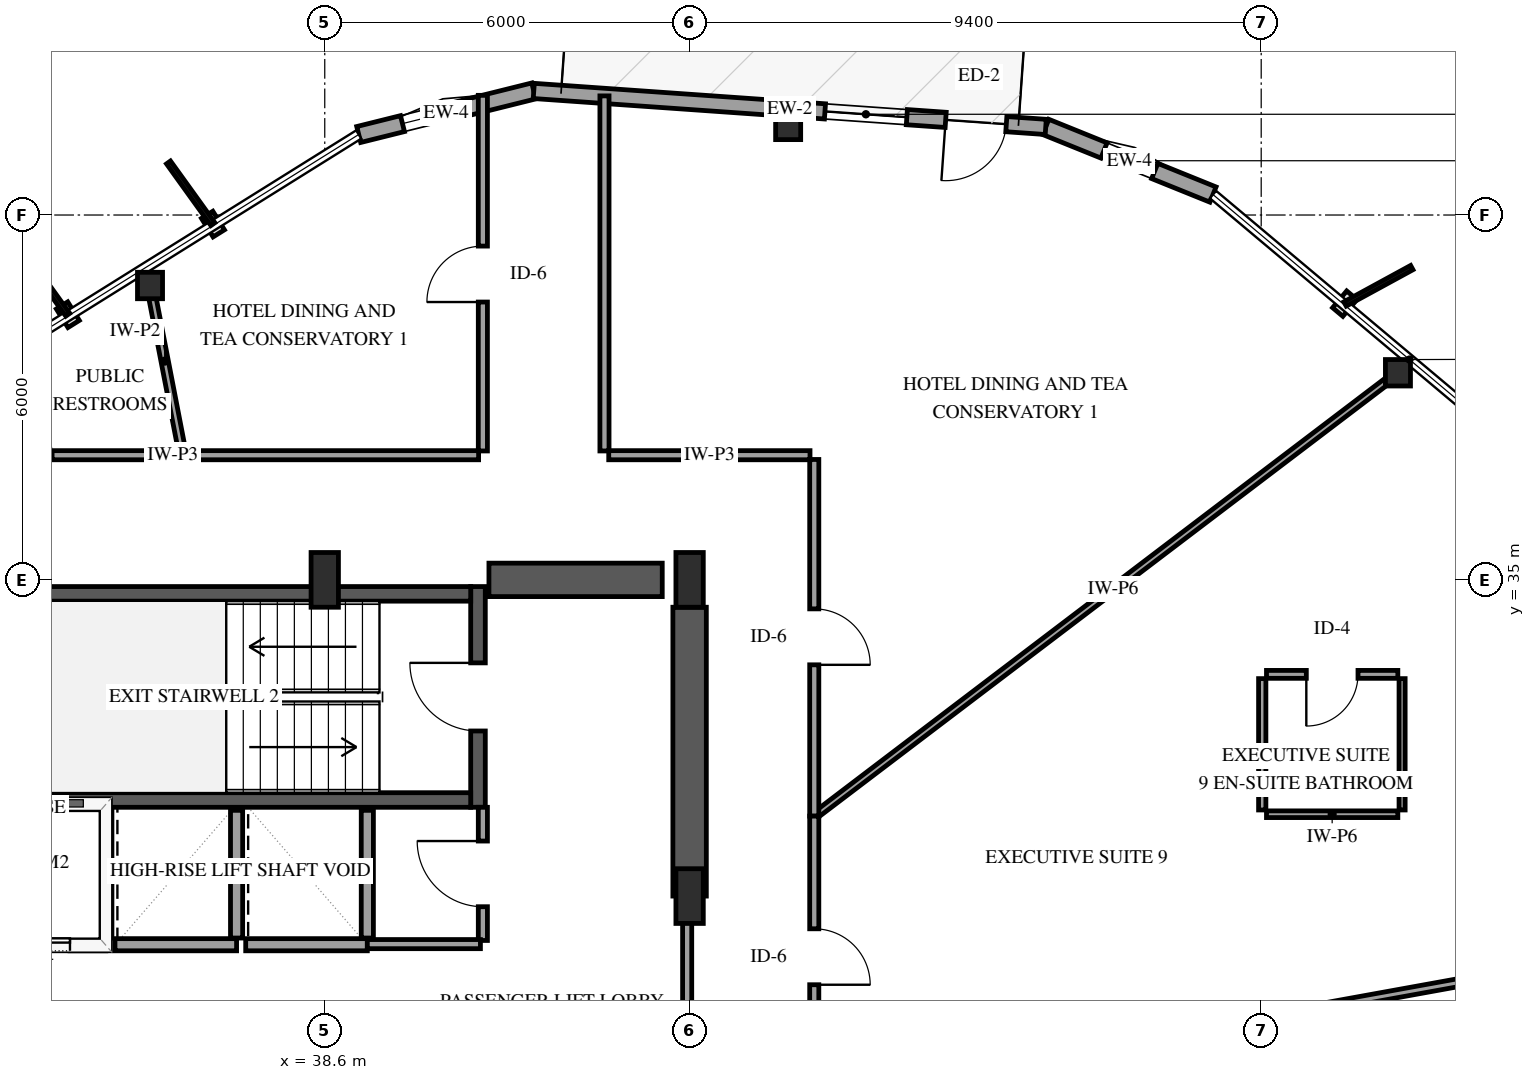
"""IFC4 building model, lengths in metres.
Left out: names, types, materials, properties, quantities, classifications, styles, units other than length and angle.
Written with IfcOpenShell. Run it as: python <this file> out.ifc"""

import sys

from ifc_helpers import new_model, si_unit, direction, frame, frame_2d, origin, origin_2d, place, context, subcontext, project, spatial, rectangle, i_section, extrude, element, fill, save


model = new_model("IFC4")
c1 = context("Model", 3, precision=1e-05, world=origin(), true_north=direction((0.0, 1.0)))
c2 = subcontext(c1, "Body", "Model", "MODEL_VIEW")
j1 = project(units=[si_unit("LENGTHUNIT", "METRE"), si_unit("PLANEANGLEUNIT", "RADIAN")], contexts=[c1])
p1 = place(None, origin())
s1 = spatial("IfcSite", under=j1, at=p1, CompositionType="ELEMENT")
p2 = place(p1, origin())
s2 = spatial("IfcBuilding", under=s1, at=p2, CompositionType="ELEMENT")
p3 = place(p2, frame((0.0, 0.0, 157.0)))
s3 = spatial("IfcBuildingStorey", under=s2, at=p3, CompositionType="ELEMENT", Elevation=157.0)
p4 = place(p3, frame((41.12, 31.26, 0.0), z_axis=(0.0, 0.0, 1.0), x_axis=(0.0, 1.0, 0.0)))
e1 = element("IfcWall", 1, at=p4, inside=s3, PredefinedType="SHEAR", context=c2, shape_type="SweptSolid", body=[
    extrude(rectangle(XDim=3.63, YDim=0.24, at=frame_2d((1.815, 0.0))), origin(), (0.0, 0.0, 1.0), 3.6),
])
p5 = place(p4, frame((1.255, 0.0, 0.0)))
e2 = element("IfcOpeningElement", 2, at=p5, cuts=e1, PredefinedType="OPENING", context=c2, shape_type="SweptSolid", body=[
    extrude(rectangle(XDim=1.12, YDim=2.15, at=frame_2d((0.56, 1.075))), frame((0.0, 0.13, 0.0), z_axis=(0.0, -1.0, 0.0), x_axis=(1.0, 0.0, 0.0)), (0.0, 0.0, 1.0), 0.26),
])
for number, where, z_axis, x_axis in (
    (3, (33.0, 31.38, 0.0), (0.0, 0.0, 1.0), (1.0, 0.0, 0.0)),
    (4, (33.0, 34.77, 0.0), (0.0, 0.0, 1.0), (1.0, 0.0, 0.0)),
):
    element("IfcWall", number, at=place(p3, frame(where, z_axis=z_axis, x_axis=x_axis)), inside=s3, PredefinedType="SHEAR", context=c2, shape_type="SweptSolid", body=[
        extrude(rectangle(XDim=8.0, YDim=0.24, at=frame_2d((4.0, 0.0))), origin(), (0.0, 0.0, 1.0), 3.6),
    ])
p6 = place(p3, frame((41.3, 35.0, 0.0), z_axis=(0.0, 0.0, 1.0), x_axis=(1.0, 0.0, 0.0)))
e5 = element("IfcWall", 5, at=p6, inside=s3, PredefinedType="SHEAR", context=c2, shape_type="SweptSolid", body=[
    extrude(rectangle(XDim=2.85, YDim=0.55, at=frame_2d((1.425, 0.0))), origin(), (0.0, 0.0, 1.0), 3.6),
])
p7 = place(p3, frame((44.6, 29.8, 0.0), z_axis=(0.0, 0.0, 1.0), x_axis=(0.0, 1.0, 0.0)))
e6 = element("IfcWall", 6, at=p7, inside=s3, PredefinedType="SHEAR", context=c2, shape_type="SweptSolid", body=[
    extrude(rectangle(XDim=4.75, YDim=0.55, at=frame_2d((2.375, 0.0))), origin(), (0.0, 0.0, 1.0), 3.6),
])
for number, where, z_axis, x_axis in (
    (7, (38.6, 35.0, 0.0), (0.0, 0.0, 1.0), (1.0, 0.0, 0.0)),
    (8, (44.6, 29.8, 0.0), (0.0, 0.0, 1.0), (1.0, 0.0, 0.0)),
    (9, (44.6, 35.0, 0.0), (0.0, 0.0, 1.0), (1.0, 0.0, 0.0)),
):
    element("IfcColumn", number, at=place(p3, frame(where, z_axis=z_axis, x_axis=x_axis)), inside=s3, PredefinedType="PILASTER", context=c2, shape_type="SweptSolid", body=[
        extrude(rectangle(XDim=0.45, YDim=0.9, at=origin_2d()), origin(), (0.0, 0.0, 1.0), 3.6),
    ])
for number, where, z_axis, x_axis in (
    (10, (56.249, 38.406, 0.0), (0.0, 0.0, 1.0), (1.0, 0.0, 0.0)),
    (11, (46.221, 42.458, 0.0), (0.0, 0.0, 1.0), (1.0, 0.0, 0.0)),
    (12, (35.726, 39.841, 0.0), (0.0, 0.0, 1.0), (1.0, 0.0, 0.0)),
):
    element("IfcColumn", number, at=place(p3, frame(where, z_axis=z_axis, x_axis=x_axis)), inside=s3, PredefinedType="COLUMN", context=c2, shape_type="SweptSolid", body=[
        extrude(i_section(OverallWidth=0.412, OverallDepth=0.435, WebThickness=0.036, FlangeThickness=0.057, FilletRadius=0.038, at=origin_2d()), origin(), (0.0, 0.0, 1.0), 3.6),
    ])
p8 = place(p3, frame((53.207, 41.337, 0.0), z_axis=(0.0, 0.0, 1.0), x_axis=(-0.927079641451, 0.374864426703, 0.0)))
e13 = element("IfcWall", 13, at=p8, inside=s3, PredefinedType="SOLIDWALL", context=c2, shape_type="SweptSolid", body=[
    extrude(rectangle(XDim=2.967, YDim=0.27, at=frame_2d((1.483, 0.0))), origin(), (0.0, 0.0, 1.0), 2.679),
])
p9 = place(p8, frame((1.033, 0.0, 0.75)))
e14 = element("IfcOpeningElement", 14, at=p9, cuts=e13, PredefinedType="OPENING", context=c2, shape_type="SweptSolid", body=[
    extrude(rectangle(XDim=0.9, YDim=1.5, at=frame_2d((0.45, 0.75))), frame((0.0, 0.145, 0.0), z_axis=(0.0, -1.0, 0.0), x_axis=(1.0, 0.0, 0.0)), (0.0, 0.0, 1.0), 0.29),
])
p10 = place(p3, frame((42.037, 43.041, 0.0), z_axis=(0.0, 0.0, 1.0), x_axis=(-0.970388894823, -0.241547909957, 0.0)))
e15 = element("IfcWall", 15, at=p10, inside=s3, PredefinedType="SOLIDWALL", context=c2, shape_type="SweptSolid", body=[
    extrude(rectangle(XDim=2.967, YDim=0.27, at=frame_2d((1.483, 0.0))), origin(), (0.0, 0.0, 1.0), 2.679),
])
p11 = place(p10, frame((1.325, 0.0, 0.75)))
e16 = element("IfcOpeningElement", 16, at=p11, cuts=e15, PredefinedType="OPENING", context=c2, shape_type="SweptSolid", body=[
    extrude(rectangle(XDim=0.9, YDim=1.5, at=frame_2d((0.45, 0.75))), frame((0.0, 0.145, 0.0), z_axis=(0.0, -1.0, 0.0), x_axis=(1.0, 0.0, 0.0)), (0.0, 0.0, 1.0), 0.29),
])
p12 = place(p3, frame((50.457, 42.449, 0.0), z_axis=(0.0, 0.0, 1.0), x_axis=(-0.997538958877, 0.070114374585, 0.0)))
e17 = element("IfcWall", 17, at=p12, inside=s3, PredefinedType="SOLIDWALL", context=c2, shape_type="SweptSolid", body=[
    extrude(rectangle(XDim=8.44, YDim=0.25, at=frame_2d((4.22, 0.0))), origin(), (0.0, 0.0, 1.0), 2.679),
])
p13 = place(p12, frame((0.65, 0.0, 0.0)))
e18 = element("IfcOpeningElement", 18, at=p13, cuts=e17, PredefinedType="OPENING", context=c2, shape_type="SweptSolid", body=[
    extrude(rectangle(XDim=1.0, YDim=2.15, at=frame_2d((0.5, 1.075))), frame((0.0, 0.135, 0.0), z_axis=(0.0, -1.0, 0.0), x_axis=(1.0, 0.0, 0.0)), (0.0, 0.0, 1.0), 0.27),
])
p14 = place(p12, frame((2.29, 0.0, 0.72)))
e19 = element("IfcOpeningElement", 19, at=p14, cuts=e17, PredefinedType="OPENING", context=c2, shape_type="SweptSolid", body=[
    extrude(rectangle(XDim=1.35, YDim=1.65, at=frame_2d((0.675, 0.825))), frame((0.0, 0.135, 0.0), z_axis=(0.0, -1.0, 0.0), x_axis=(1.0, 0.0, 0.0)), (0.0, 0.0, 1.0), 0.27),
])
p15 = place(p3, frame((32.72, 29.0, 0.0), z_axis=(0.0, 0.0, 1.0), x_axis=(1.0, 0.0, 0.0)))
e20 = element("IfcWall", 20, at=p15, inside=s3, PredefinedType="SOLIDWALL", context=c2, shape_type="SweptSolid", body=[
    extrude(rectangle(XDim=2.28, YDim=0.2, at=frame_2d((1.14, 0.0))), origin(), (0.0, 0.0, 1.0), 3.3),
])
p16 = place(p15, frame((0.59, 0.0, 0.0)))
e21 = element("IfcOpeningElement", 21, at=p16, cuts=e20, PredefinedType="OPENING", context=c2, shape_type="SweptSolid", body=[
    extrude(rectangle(XDim=1.1, YDim=2.15, at=frame_2d((0.55, 1.075))), frame((0.0, 0.11, 0.0), z_axis=(0.0, -1.0, 0.0), x_axis=(1.0, 0.0, 0.0)), (0.0, 0.0, 1.0), 0.22),
])
p17 = place(p3, frame((35.0, 29.11, 0.0), z_axis=(0.0, 0.0, 1.0), x_axis=(0.0, 1.0, 0.0)))
e22 = element("IfcWall", 22, at=p17, inside=s3, PredefinedType="SOLIDWALL", context=c2, shape_type="SweptSolid", body=[
    extrude(rectangle(XDim=2.1, YDim=0.2, at=frame_2d((1.05, 0.0))), origin(), (0.0, 0.0, 1.0), 3.3),
])
p18 = place(p3, frame((35.15, 29.0, 0.0), z_axis=(0.0, 0.0, 1.0), x_axis=(1.0, 0.0, 0.0)))
e23 = element("IfcWall", 23, at=p18, inside=s3, PredefinedType="SOLIDWALL", context=c2, shape_type="SweptSolid", body=[
    extrude(rectangle(XDim=2.0, YDim=0.2, at=frame_2d((1.0, 0.0))), origin(), (0.0, 0.0, 1.0), 3.3),
])
p19 = place(p3, frame((37.15, 29.11, 0.0), z_axis=(0.0, 0.0, 1.0), x_axis=(0.0, 1.0, 0.0)))
e24 = element("IfcWall", 24, at=p19, inside=s3, PredefinedType="SOLIDWALL", context=c2, shape_type="SweptSolid", body=[
    extrude(rectangle(XDim=2.1, YDim=0.2, at=frame_2d((1.05, 0.0))), origin(), (0.0, 0.0, 1.0), 3.3),
])
p20 = place(p3, frame((37.3, 29.0, 0.0), z_axis=(0.0, 0.0, 1.0), x_axis=(1.0, 0.0, 0.0)))
e25 = element("IfcWall", 25, at=p20, inside=s3, PredefinedType="SOLIDWALL", context=c2, shape_type="SweptSolid", body=[
    extrude(rectangle(XDim=2.0, YDim=0.2, at=frame_2d((1.0, 0.0))), origin(), (0.0, 0.0, 1.0), 3.3),
])
p21 = place(p3, frame((39.3, 29.11, 0.0), z_axis=(0.0, 0.0, 1.0), x_axis=(0.0, 1.0, 0.0)))
e26 = element("IfcWall", 26, at=p21, inside=s3, PredefinedType="SOLIDWALL", context=c2, shape_type="SweptSolid", body=[
    extrude(rectangle(XDim=2.1, YDim=0.2, at=frame_2d((1.05, 0.0))), origin(), (0.0, 0.0, 1.0), 3.3),
])
p22 = place(p3, frame((62.264, 29.286, 0.0), z_axis=(0.0, 0.0, 1.0), x_axis=(-0.98399202702, -0.178212487671, 0.0)))
e27 = element("IfcWall", 27, at=p22, inside=s3, PredefinedType="PARTITIONING", context=c2, shape_type="SweptSolid", body=[
    extrude(rectangle(XDim=15.868, YDim=0.13, at=frame_2d((7.934, 0.0))), origin(), (0.0, 0.0, 1.0), 2.595),
])
p23 = place(p3, frame((46.65, 31.115, 0.0), z_axis=(0.0, 0.0, 1.0), x_axis=(0.796312645744, 0.60488525377, 0.0)))
e28 = element("IfcWall", 28, at=p23, inside=s3, PredefinedType="PARTITIONING", context=c2, shape_type="SweptSolid", body=[
    extrude(rectangle(XDim=12.349, YDim=0.11, at=frame_2d((6.175, 0.0))), origin(), (0.0, 0.0, 1.0), 3.3),
])
p24 = place(p3, frame((44.56, 29.8, 0.0), z_axis=(0.0, 0.0, 1.0), x_axis=(0.0, -1.0, 0.0)))
e29 = element("IfcWall", 29, at=p24, inside=s3, PredefinedType="PARTITIONING", context=c2, shape_type="SweptSolid", body=[
    extrude(rectangle(XDim=6.91, YDim=0.15, at=frame_2d((3.455, 0.0))), origin(), (0.0, 0.0, 1.0), 2.34),
])
p25 = place(p24, frame((2.915, 0.0, 0.0)))
e30 = element("IfcOpeningElement", 30, at=p25, cuts=e29, PredefinedType="OPENING", context=c2, shape_type="SweptSolid", body=[
    extrude(rectangle(XDim=1.08, YDim=2.15, at=frame_2d((0.54, 1.075))), frame((0.0, 0.085, 0.0), z_axis=(0.0, -1.0, 0.0), x_axis=(1.0, 0.0, 0.0)), (0.0, 0.0, 1.0), 0.17),
])
p26 = place(p3, frame((46.65, 36.98, 0.0), z_axis=(0.0, 0.0, 1.0), x_axis=(0.0, -1.0, 0.0)))
e31 = element("IfcWall", 31, at=p26, inside=s3, PredefinedType="PARTITIONING", context=c2, shape_type="SweptSolid", body=[
    extrude(rectangle(XDim=5.865, YDim=0.15, at=frame_2d((2.933, 0.0))), origin(), (0.0, 0.0, 1.0), 3.3),
])
p27 = place(p26, frame((2.457, 0.0, 0.0)))
e32 = element("IfcOpeningElement", 32, at=p27, cuts=e31, PredefinedType="OPENING", context=c2, shape_type="SweptSolid", body=[
    extrude(rectangle(XDim=0.92, YDim=2.12, at=frame_2d((0.46, 1.06))), frame((0.0, 0.085, 0.0), z_axis=(0.0, -1.0, 0.0), x_axis=(1.0, 0.0, 0.0)), (0.0, 0.0, 1.0), 0.17),
])
p28 = place(p3, frame((41.2, 37.12, 0.0), z_axis=(0.0, 0.0, 1.0), x_axis=(0.0, 1.0, 0.0)))
e33 = element("IfcWall", 33, at=p28, inside=s3, PredefinedType="PARTITIONING", context=c2, shape_type="SweptSolid", body=[
    extrude(rectangle(XDim=5.848, YDim=0.15, at=frame_2d((2.924, 0.0))), origin(), (0.0, 0.0, 1.0), 3.3),
])
p29 = place(p28, frame((2.449, 0.0, 0.0)))
e34 = element("IfcOpeningElement", 34, at=p29, cuts=e33, PredefinedType="OPENING", context=c2, shape_type="SweptSolid", body=[
    extrude(rectangle(XDim=0.92, YDim=2.12, at=frame_2d((0.46, 1.06))), frame((0.0, 0.085, 0.0), z_axis=(0.0, -1.0, 0.0), x_axis=(1.0, 0.0, 0.0)), (0.0, 0.0, 1.0), 0.17),
])
p30 = place(p3, frame((43.2, 42.959, 0.0), z_axis=(0.0, 0.0, 1.0), x_axis=(0.0, -1.0, 0.0)))
e35 = element("IfcWall", 35, at=p30, inside=s3, PredefinedType="PARTITIONING", context=c2, shape_type="SweptSolid", body=[
    extrude(rectangle(XDim=5.839, YDim=0.15, at=frame_2d((2.919, 0.0))), origin(), (0.0, 0.0, 1.0), 2.674),
])
p31 = place(p3, frame((31.074, 37.05, 0.0), z_axis=(0.0, 0.0, 1.0), x_axis=(1.0, 0.0, 0.0)))
e36 = element("IfcWall", 36, at=p31, inside=s3, PredefinedType="PARTITIONING", context=c2, shape_type="SweptSolid", body=[
    extrude(rectangle(XDim=5.193, YDim=0.15, at=frame_2d((2.597, 0.0))), origin(), (0.0, 0.0, 1.0), 3.3),
])
p32 = place(p31, frame((2.122, 0.0, 0.0)))
e37 = element("IfcOpeningElement", 37, at=p32, cuts=e36, PredefinedType="OPENING", context=c2, shape_type="SweptSolid", body=[
    extrude(rectangle(XDim=0.92, YDim=2.12, at=frame_2d((0.46, 1.06))), frame((0.0, 0.085, 0.0), z_axis=(0.0, -1.0, 0.0), x_axis=(1.0, 0.0, 0.0)), (0.0, 0.0, 1.0), 0.17),
])
p33 = place(p3, frame((36.267, 37.05, 0.0), z_axis=(0.0, 0.0, 1.0), x_axis=(1.0, 0.0, 0.0)))
e38 = element("IfcWall", 38, at=p33, inside=s3, PredefinedType="PARTITIONING", context=c2, shape_type="SweptSolid", body=[
    extrude(rectangle(XDim=4.863, YDim=0.15, at=frame_2d((2.431, 0.0))), origin(), (0.0, 0.0, 1.0), 3.3),
])
p34 = place(p3, frame((46.65, 31.115, 0.0), z_axis=(0.0, 0.0, 1.0), x_axis=(0.0, -1.0, 0.0)))
e39 = element("IfcWall", 39, at=p34, inside=s3, PredefinedType="PARTITIONING", context=c2, shape_type="SweptSolid", body=[
    extrude(rectangle(XDim=4.657, YDim=0.15, at=frame_2d((2.329, 0.0))), origin(), (0.0, 0.0, 1.0), 3.3),
])
p35 = place(p34, frame((1.853, 0.0, 0.0)))
e40 = element("IfcOpeningElement", 40, at=p35, cuts=e39, PredefinedType="OPENING", context=c2, shape_type="SweptSolid", body=[
    extrude(rectangle(XDim=0.92, YDim=2.12, at=frame_2d((0.46, 1.06))), frame((0.0, 0.085, 0.0), z_axis=(0.0, -1.0, 0.0), x_axis=(1.0, 0.0, 0.0)), (0.0, 0.0, 1.0), 0.17),
])
p36 = place(p3, frame((43.27, 37.05, 0.0), z_axis=(0.0, 0.0, 1.0), x_axis=(1.0, 0.0, 0.0)))
e41 = element("IfcWall", 41, at=p36, inside=s3, PredefinedType="PARTITIONING", context=c2, shape_type="SweptSolid", body=[
    extrude(rectangle(XDim=3.31, YDim=0.15, at=frame_2d((1.655, 0.0))), origin(), (0.0, 0.0, 1.0), 3.3),
])
p37 = place(p3, frame((36.267, 37.05, 0.0), z_axis=(0.0, 0.0, 1.0), x_axis=(-0.190108621236, 0.981763063133, 0.0)))
e42 = element("IfcWall", 42, at=p37, inside=s3, PredefinedType="PARTITIONING", context=c2, shape_type="SweptSolid", body=[
    extrude(rectangle(XDim=3.151, YDim=0.12, at=frame_2d((1.576, 0.0))), origin(), (0.0, 0.0, 1.0), 2.595),
])
p38 = place(p3, frame((41.2, 29.07, 0.0), z_axis=(0.0, 0.0, 1.0), x_axis=(0.0, 1.0, 0.0)))
e43 = element("IfcWall", 43, at=p38, inside=s3, PredefinedType="PARTITIONING", context=c2, shape_type="SweptSolid", body=[
    extrude(rectangle(XDim=2.19, YDim=0.15, at=frame_2d((1.095, 0.0))), origin(), (0.0, 0.0, 1.0), 3.3),
])
p39 = place(p38, frame((0.555, 0.0, 0.0)))
e44 = element("IfcOpeningElement", 44, at=p39, cuts=e43, PredefinedType="OPENING", context=c2, shape_type="SweptSolid", body=[
    extrude(rectangle(XDim=1.08, YDim=2.15, at=frame_2d((0.54, 1.075))), frame((0.0, 0.085, 0.0), z_axis=(0.0, -1.0, 0.0), x_axis=(1.0, 0.0, 0.0)), (0.0, 0.0, 1.0), 0.17),
])
p40 = place(p3, frame((56.247, 33.446, 0.0), z_axis=(0.0, 0.0, 1.0), x_axis=(-1.0, 0.0, 0.0)))
e45 = element("IfcWall", 45, at=p40, inside=s3, PredefinedType="PARTITIONING", context=c2, shape_type="SweptSolid", body=[
    extrude(rectangle(XDim=2.16, YDim=0.13, at=frame_2d((1.08, 0.0))), origin(), (0.0, 0.0, 1.0), 3.3),
])
p41 = place(p40, frame((0.655, 0.0, 0.0)))
e46 = element("IfcOpeningElement", 46, at=p41, cuts=e45, PredefinedType="OPENING", context=c2, shape_type="SweptSolid", body=[
    extrude(rectangle(XDim=0.85, YDim=2.1, at=frame_2d((0.425, 1.05))), frame((0.0, 0.075, 0.0), z_axis=(0.0, -1.0, 0.0), x_axis=(1.0, 0.0, 0.0)), (0.0, 0.0, 1.0), 0.15),
])
p42 = place(p3, frame((54.017, 33.376, 0.0), z_axis=(0.0, 0.0, 1.0), x_axis=(0.0, -1.0, 0.0)))
e47 = element("IfcWall", 47, at=p42, inside=s3, PredefinedType="PARTITIONING", context=c2, shape_type="SweptSolid", body=[
    extrude(rectangle(XDim=2.16, YDim=0.12, at=frame_2d((1.08, 0.0))), origin(), (0.0, 0.0, 1.0), 3.3),
])
p43 = place(p3, frame((54.087, 31.146, 0.0), z_axis=(0.0, 0.0, 1.0), x_axis=(1.0, 0.0, 0.0)))
e48 = element("IfcWall", 48, at=p43, inside=s3, PredefinedType="PARTITIONING", context=c2, shape_type="SweptSolid", body=[
    extrude(rectangle(XDim=2.16, YDim=0.11, at=frame_2d((1.08, 0.0))), origin(), (0.0, 0.0, 1.0), 3.3),
])
p44 = place(p3, frame((56.317, 31.216, 0.0), z_axis=(0.0, 0.0, 1.0), x_axis=(0.0, 1.0, 0.0)))
e49 = element("IfcWall", 49, at=p44, inside=s3, PredefinedType="PARTITIONING", context=c2, shape_type="SweptSolid", body=[
    extrude(rectangle(XDim=2.16, YDim=0.1, at=frame_2d((1.08, 0.0))), origin(), (0.0, 0.0, 1.0), 3.3),
])
p45 = place(p3, frame((39.3, 29.01, 0.0), z_axis=(0.0, 0.0, 1.0), x_axis=(1.0, 0.0, 0.0)))
e50 = element("IfcWall", 50, at=p45, inside=s3, PredefinedType="PARTITIONING", context=c2, shape_type="SweptSolid", body=[
    extrude(rectangle(XDim=1.86, YDim=0.15, at=frame_2d((0.93, 0.0))), origin(), (0.0, 0.0, 1.0), 3.3),
])
p46 = place(p9, origin())
e51 = element("IfcWindow", 51, at=p46, inside=s3, PartitioningType="SINGLE_PANEL", PredefinedType="WINDOW", context=c2, shape_type="SweptSolid", body=[
    extrude(rectangle(XDim=0.9, YDim=1.5, at=frame_2d((0.45, 0.75))), frame((0.0, 0.03, 0.0), z_axis=(0.0, -1.0, 0.0), x_axis=(1.0, 0.0, 0.0)), (0.0, 0.0, 1.0), 0.06),
])
fill(e14, e51)
p47 = place(p11, origin())
e52 = element("IfcWindow", 52, at=p47, inside=s3, PartitioningType="SINGLE_PANEL", PredefinedType="WINDOW", context=c2, shape_type="SweptSolid", body=[
    extrude(rectangle(XDim=0.9, YDim=1.5, at=frame_2d((0.45, 0.75))), frame((0.0, 0.03, 0.0), z_axis=(0.0, -1.0, 0.0), x_axis=(1.0, 0.0, 0.0)), (0.0, 0.0, 1.0), 0.06),
])
fill(e16, e52)
p48 = place(p13, origin())
e53 = element("IfcDoor", 53, at=p48, inside=s3, OperationType="SINGLE_SWING_RIGHT", PredefinedType="DOOR", context=c2, shape_type="SweptSolid", body=[
    extrude(rectangle(XDim=1.0, YDim=2.15, at=frame_2d((0.5, 1.075))), frame((0.0, 0.025, 0.0), z_axis=(0.0, -1.0, 0.0), x_axis=(1.0, 0.0, 0.0)), (0.0, 0.0, 1.0), 0.05),
])
fill(e18, e53)
p49 = place(p14, origin())
e54 = element("IfcWindow", 54, at=p49, inside=s3, PartitioningType="SINGLE_PANEL", PredefinedType="WINDOW", context=c2, shape_type="SweptSolid", body=[
    extrude(rectangle(XDim=1.35, YDim=1.65, at=frame_2d((0.675, 0.825))), frame((0.0, 0.03, 0.0), z_axis=(0.0, -1.0, 0.0), x_axis=(1.0, 0.0, 0.0)), (0.0, 0.0, 1.0), 0.06),
])
fill(e19, e54)
p50 = place(p16, origin())
e55 = element("IfcDoor", 55, at=p50, inside=s3, OperationType="SLIDING_TO_LEFT", PredefinedType="DOOR", context=c2, shape_type="SweptSolid", body=[
    extrude(rectangle(XDim=1.1, YDim=2.15, at=frame_2d((0.55, 1.075))), frame((0.0, 0.025, 0.0), z_axis=(0.0, -1.0, 0.0), x_axis=(1.0, 0.0, 0.0)), (0.0, 0.0, 1.0), 0.05),
])
fill(e21, e55)
p51 = place(p5, origin())
e56 = element("IfcDoor", 56, at=p51, inside=s3, OperationType="SINGLE_SWING_RIGHT", PredefinedType="DOOR", context=c2, shape_type="SweptSolid", body=[
    extrude(rectangle(XDim=1.12, YDim=2.15, at=frame_2d((0.56, 1.075))), frame((0.0, 0.025, 0.0), z_axis=(0.0, -1.0, 0.0), x_axis=(1.0, 0.0, 0.0)), (0.0, 0.0, 1.0), 0.05),
])
fill(e2, e56)
p52 = place(p27, origin())
e57 = element("IfcDoor", 57, at=p52, inside=s3, OperationType="SINGLE_SWING_RIGHT", PredefinedType="DOOR", context=c2, shape_type="SweptSolid", body=[
    extrude(rectangle(XDim=0.92, YDim=2.12, at=frame_2d((0.46, 1.06))), frame((0.0, 0.025, 0.0), z_axis=(0.0, -1.0, 0.0), x_axis=(1.0, 0.0, 0.0)), (0.0, 0.0, 1.0), 0.05),
])
fill(e32, e57)
p53 = place(p29, origin())
e58 = element("IfcDoor", 58, at=p53, inside=s3, OperationType="SINGLE_SWING_LEFT", PredefinedType="DOOR", context=c2, shape_type="SweptSolid", body=[
    extrude(rectangle(XDim=0.92, YDim=2.12, at=frame_2d((0.46, 1.06))), frame((0.0, 0.025, 0.0), z_axis=(0.0, -1.0, 0.0), x_axis=(1.0, 0.0, 0.0)), (0.0, 0.0, 1.0), 0.05),
])
fill(e34, e58)
p54 = place(p35, origin())
e59 = element("IfcDoor", 59, at=p54, inside=s3, OperationType="SINGLE_SWING_RIGHT", PredefinedType="DOOR", context=c2, shape_type="SweptSolid", body=[
    extrude(rectangle(XDim=0.92, YDim=2.12, at=frame_2d((0.46, 1.06))), frame((0.0, 0.025, 0.0), z_axis=(0.0, -1.0, 0.0), x_axis=(1.0, 0.0, 0.0)), (0.0, 0.0, 1.0), 0.05),
])
fill(e40, e59)
p55 = place(p39, origin())
e60 = element("IfcDoor", 60, at=p55, inside=s3, OperationType="SINGLE_SWING_RIGHT", PredefinedType="DOOR", context=c2, shape_type="SweptSolid", body=[
    extrude(rectangle(XDim=1.08, YDim=2.15, at=frame_2d((0.54, 1.075))), frame((0.0, 0.025, 0.0), z_axis=(0.0, -1.0, 0.0), x_axis=(1.0, 0.0, 0.0)), (0.0, 0.0, 1.0), 0.05),
])
fill(e44, e60)
p56 = place(p41, origin())
e61 = element("IfcDoor", 61, at=p56, inside=s3, OperationType="SINGLE_SWING_RIGHT", PredefinedType="DOOR", context=c2, shape_type="SweptSolid", body=[
    extrude(rectangle(XDim=0.85, YDim=2.1, at=frame_2d((0.425, 1.05))), frame((0.0, 0.025, 0.0), z_axis=(0.0, -1.0, 0.0), x_axis=(1.0, 0.0, 0.0)), (0.0, 0.0, 1.0), 0.05),
])
fill(e46, e61)
save(model, sys.argv[1])
